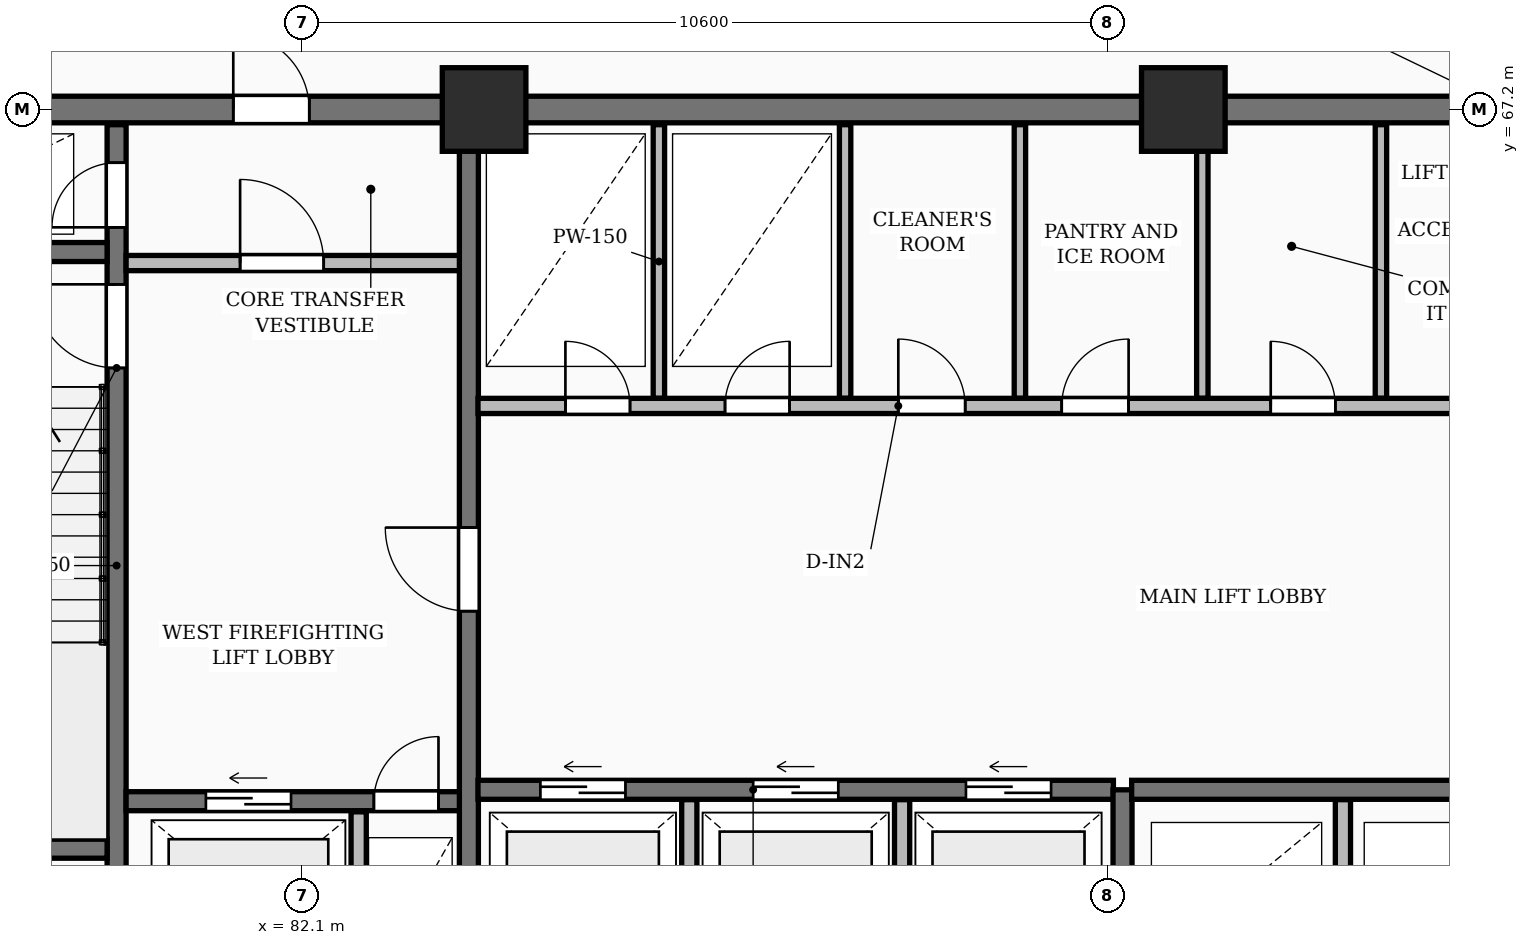
"""IFC4 building model, lengths in metres.
Left out: names, types, materials, properties, quantities, classifications, styles, units other than length and angle.
Written with IfcOpenShell. Run it as: python <this file> out.ifc"""

import sys

from ifc_helpers import new_model, si_unit, direction, frame, frame_2d, origin, origin_2d, place, context, subcontext, project, spatial, rectangle, extrude, element, fill, save


model = new_model("IFC4")
c1 = context("Model", 3, precision=1e-05, world=origin(), true_north=direction((0.0, 1.0)))
c2 = subcontext(c1, "Body", "Model", "MODEL_VIEW")
j1 = project(units=[si_unit("LENGTHUNIT", "METRE"), si_unit("PLANEANGLEUNIT", "RADIAN")], contexts=[c1])
p1 = place(None, origin())
s1 = spatial("IfcSite", under=j1, at=p1, CompositionType="ELEMENT")
p2 = place(p1, origin())
s2 = spatial("IfcBuilding", under=s1, at=p2, CompositionType="ELEMENT")
p3 = place(p2, frame((0.0, 0.0, 5.4)))
s3 = spatial("IfcBuildingStorey", under=s2, at=p3, CompositionType="ELEMENT", Elevation=5.4)
for number, where, z_axis, x_axis in (
    (1, (84.5, 67.2, 0.0), (0.0, 0.0, 1.0), (1.0, 0.0, 0.0)),
    (2, (93.7, 67.2, 0.0), (0.0, 0.0, 1.0), (1.0, 0.0, 0.0)),
):
    element("IfcColumn", number, at=place(p3, frame(where, z_axis=z_axis, x_axis=x_axis)), inside=s3, PredefinedType="COLUMN", context=c2, shape_type="SweptSolid", body=[
        extrude(rectangle(XDim=1.1, YDim=1.1, at=origin_2d()), origin(), (0.0, 0.0, 1.0), 4.6),
    ])
p4 = place(p3, frame((75.95, 67.2, 0.0), z_axis=(0.0, 0.0, 1.0), x_axis=(1.0, 0.0, 0.0)))
e3 = element("IfcWall", 3, at=p4, inside=s3, PredefinedType="SHEAR", context=c2, shape_type="SweptSolid", body=[
    extrude(rectangle(XDim=36.3, YDim=0.35, at=frame_2d((18.15, 0.0))), origin(), (0.0, 0.0, 1.0), 4.6),
])
p5 = place(p4, frame((5.25, 0.0, 0.0)))
e4 = element("IfcOpeningElement", 4, at=p5, cuts=e3, PredefinedType="OPENING", context=c2, shape_type="SweptSolid", body=[
    extrude(rectangle(XDim=1.0, YDim=2.15, at=frame_2d((0.5, 1.075))), frame((0.0, 0.185, 0.0), z_axis=(0.0, -1.0, 0.0), x_axis=(1.0, 0.0, 0.0)), (0.0, 0.0, 1.0), 0.37),
])
p6 = place(p4, frame((22.058, 0.0, 0.0)))
e5 = element("IfcOpeningElement", 5, at=p6, cuts=e3, PredefinedType="OPENING", context=c2, shape_type="SweptSolid", body=[
    extrude(rectangle(XDim=1.5, YDim=2.2, at=frame_2d((0.75, 1.1))), frame((0.0, 0.185, 0.0), z_axis=(0.0, -1.0, 0.0), x_axis=(1.0, 0.0, 0.0)), (0.0, 0.0, 1.0), 0.37),
])
p7 = place(p4, frame((30.45, 0.0, 0.0)))
e6 = element("IfcOpeningElement", 6, at=p7, cuts=e3, PredefinedType="OPENING", context=c2, shape_type="SweptSolid", body=[
    extrude(rectangle(XDim=1.0, YDim=2.15, at=frame_2d((0.5, 1.075))), frame((0.0, 0.185, 0.0), z_axis=(0.0, -1.0, 0.0), x_axis=(1.0, 0.0, 0.0)), (0.0, 0.0, 1.0), 0.37),
])
p8 = place(p3, frame((79.665, 55.4, 0.0), z_axis=(0.0, 0.0, 1.0), x_axis=(0.0, 1.0, 0.0)))
e7 = element("IfcWall", 7, at=p8, inside=s3, PredefinedType="SHEAR", context=c2, shape_type="SweptSolid", body=[
    extrude(rectangle(XDim=11.6, YDim=0.25, at=frame_2d((5.8, 0.0))), origin(), (0.0, 0.0, 1.0), 4.6),
])
p9 = place(p8, frame((0.55, 0.0, 0.0)))
e8 = element("IfcOpeningElement", 8, at=p9, cuts=e7, PredefinedType="OPENING", context=c2, shape_type="SweptSolid", body=[
    extrude(rectangle(XDim=0.85, YDim=2.05, at=frame_2d((0.425, 1.025))), frame((0.0, 0.135, 0.0), z_axis=(0.0, -1.0, 0.0), x_axis=(1.0, 0.0, 0.0)), (0.0, 0.0, 1.0), 0.27),
])
p10 = place(p8, frame((8.4, 0.0, 0.0)))
e9 = element("IfcOpeningElement", 9, at=p10, cuts=e7, PredefinedType="OPENING", context=c2, shape_type="SweptSolid", body=[
    extrude(rectangle(XDim=1.1, YDim=2.1, at=frame_2d((0.55, 1.05))), frame((0.0, 0.135, 0.0), z_axis=(0.0, -1.0, 0.0), x_axis=(1.0, 0.0, 0.0)), (0.0, 0.0, 1.0), 0.27),
])
p11 = place(p8, frame((10.25, 0.0, 0.0)))
e10 = element("IfcOpeningElement", 10, at=p11, cuts=e7, PredefinedType="OPENING", context=c2, shape_type="SweptSolid", body=[
    extrude(rectangle(XDim=0.85, YDim=2.05, at=frame_2d((0.425, 1.025))), frame((0.0, 0.135, 0.0), z_axis=(0.0, -1.0, 0.0), x_axis=(1.0, 0.0, 0.0)), (0.0, 0.0, 1.0), 0.27),
])
for number, where, z_axis, x_axis in (
    (11, (76.3, 57.475, 0.0), (0.0, 0.0, 1.0), (1.0, 0.0, 0.0)),
    (12, (76.3, 65.325, 0.0), (0.0, 0.0, 1.0), (1.0, 0.0, 0.0)),
):
    element("IfcWall", number, at=place(p3, frame(where, z_axis=z_axis, x_axis=x_axis)), inside=s3, PredefinedType="SHEAR", context=c2, shape_type="SweptSolid", body=[
        extrude(rectangle(XDim=3.24, YDim=0.25, at=frame_2d((1.62, 0.0))), origin(), (0.0, 0.0, 1.0), 4.6),
    ])
p12 = place(p3, frame((79.79, 58.1, 0.0), z_axis=(0.0, 0.0, 1.0), x_axis=(1.0, 0.0, 0.0)))
e13 = element("IfcWall", 13, at=p12, inside=s3, PredefinedType="SHEAR", context=c2, shape_type="SweptSolid", body=[
    extrude(rectangle(XDim=4.39, YDim=0.25, at=frame_2d((2.195, 0.0))), origin(), (0.0, 0.0, 1.0), 4.6),
])
p13 = place(p12, frame((1.05, 0.0, 0.0)))
e14 = element("IfcOpeningElement", 14, at=p13, cuts=e13, PredefinedType="OPENING", context=c2, shape_type="SweptSolid", body=[
    extrude(rectangle(XDim=1.12, YDim=2.12, at=frame_2d((0.56, 1.06))), frame((0.0, 0.135, 0.0), z_axis=(0.0, -1.0, 0.0), x_axis=(1.0, 0.0, 0.0)), (0.0, 0.0, 1.0), 0.27),
])
p14 = place(p12, frame((3.26, 0.0, 0.0)))
e15 = element("IfcOpeningElement", 15, at=p14, cuts=e13, PredefinedType="OPENING", context=c2, shape_type="SweptSolid", body=[
    extrude(rectangle(XDim=0.85, YDim=2.05, at=frame_2d((0.425, 1.025))), frame((0.0, 0.135, 0.0), z_axis=(0.0, -1.0, 0.0), x_axis=(1.0, 0.0, 0.0)), (0.0, 0.0, 1.0), 0.27),
])
p15 = place(p3, frame((82.85, 55.4, 0.0), z_axis=(0.0, 0.0, 1.0), x_axis=(0.0, 1.0, 0.0)))
e16 = element("IfcWall", 16, at=p15, inside=s3, PredefinedType="PARTITIONING", context=c2, shape_type="SweptSolid", body=[
    extrude(rectangle(XDim=2.56, YDim=0.2, at=frame_2d((1.28, 0.0))), origin(), (0.0, 0.0, 1.0), 4.3),
])
p16 = place(p3, frame((79.79, 65.18, 0.0), z_axis=(0.0, 0.0, 1.0), x_axis=(1.0, 0.0, 0.0)))
e17 = element("IfcWall", 17, at=p16, inside=s3, PredefinedType="PARTITIONING", context=c2, shape_type="SweptSolid", body=[
    extrude(rectangle(XDim=4.39, YDim=0.2, at=frame_2d((2.195, 0.0))), origin(), (0.0, 0.0, 1.0), 4.3),
])
p17 = place(p16, frame((1.5, 0.0, 0.0)))
e18 = element("IfcOpeningElement", 18, at=p17, cuts=e17, PredefinedType="OPENING", context=c2, shape_type="SweptSolid", body=[
    extrude(rectangle(XDim=1.1, YDim=2.1, at=frame_2d((0.55, 1.05))), frame((0.0, 0.11, 0.0), z_axis=(0.0, -1.0, 0.0), x_axis=(1.0, 0.0, 0.0)), (0.0, 0.0, 1.0), 0.22),
])
p18 = place(p3, frame((84.3, 55.4, 0.0), z_axis=(0.0, 0.0, 1.0), x_axis=(0.0, 1.0, 0.0)))
e19 = element("IfcWall", 19, at=p18, inside=s3, PredefinedType="SHEAR", context=c2, shape_type="SweptSolid", body=[
    extrude(rectangle(XDim=11.6, YDim=0.25, at=frame_2d((5.8, 0.0))), origin(), (0.0, 0.0, 1.0), 4.6),
])
p19 = place(p18, frame((5.2, 0.0, 0.0)))
e20 = element("IfcOpeningElement", 20, at=p19, cuts=e19, PredefinedType="OPENING", context=c2, shape_type="SweptSolid", body=[
    extrude(rectangle(XDim=1.1, YDim=2.1, at=frame_2d((0.55, 1.05))), frame((0.0, 0.135, 0.0), z_axis=(0.0, -1.0, 0.0), x_axis=(1.0, 0.0, 0.0)), (0.0, 0.0, 1.0), 0.27),
])
for number, where, z_axis, x_axis in (
    (21, (87.2, 55.4, 0.0), (0.0, 0.0, 1.0), (0.0, 1.0, 0.0)),
    (22, (90.0, 55.4, 0.0), (0.0, 0.0, 1.0), (0.0, 1.0, 0.0)),
):
    element("IfcWall", number, at=place(p3, frame(where, z_axis=z_axis, x_axis=x_axis)), inside=s3, PredefinedType="PARTITIONING", context=c2, shape_type="SweptSolid", body=[
        extrude(rectangle(XDim=2.72, YDim=0.2, at=frame_2d((1.36, 0.0))), origin(), (0.0, 0.0, 1.0), 4.3),
    ])
p20 = place(p3, frame((84.42, 58.25, 0.0), z_axis=(0.0, 0.0, 1.0), x_axis=(1.0, 0.0, 0.0)))
e23 = element("IfcWall", 23, at=p20, inside=s3, PredefinedType="SHEAR", context=c2, shape_type="SweptSolid", body=[
    extrude(rectangle(XDim=8.36, YDim=0.25, at=frame_2d((4.18, 0.0))), origin(), (0.0, 0.0, 1.0), 4.6),
])
p21 = place(p20, frame((0.82, 0.0, 0.0)))
e24 = element("IfcOpeningElement", 24, at=p21, cuts=e23, PredefinedType="OPENING", context=c2, shape_type="SweptSolid", body=[
    extrude(rectangle(XDim=1.12, YDim=2.12, at=frame_2d((0.56, 1.06))), frame((0.0, 0.135, 0.0), z_axis=(0.0, -1.0, 0.0), x_axis=(1.0, 0.0, 0.0)), (0.0, 0.0, 1.0), 0.27),
])
p22 = place(p20, frame((3.62, 0.0, 0.0)))
e25 = element("IfcOpeningElement", 25, at=p22, cuts=e23, PredefinedType="OPENING", context=c2, shape_type="SweptSolid", body=[
    extrude(rectangle(XDim=1.12, YDim=2.12, at=frame_2d((0.56, 1.06))), frame((0.0, 0.135, 0.0), z_axis=(0.0, -1.0, 0.0), x_axis=(1.0, 0.0, 0.0)), (0.0, 0.0, 1.0), 0.27),
])
p23 = place(p20, frame((6.42, 0.0, 0.0)))
e26 = element("IfcOpeningElement", 26, at=p23, cuts=e23, PredefinedType="OPENING", context=c2, shape_type="SweptSolid", body=[
    extrude(rectangle(XDim=1.12, YDim=2.12, at=frame_2d((0.56, 1.06))), frame((0.0, 0.135, 0.0), z_axis=(0.0, -1.0, 0.0), x_axis=(1.0, 0.0, 0.0)), (0.0, 0.0, 1.0), 0.27),
])
p24 = place(p3, frame((92.9, 55.4, 0.0), z_axis=(0.0, 0.0, 1.0), x_axis=(0.0, 1.0, 0.0)))
e27 = element("IfcWall", 27, at=p24, inside=s3, PredefinedType="SHEAR", context=c2, shape_type="SweptSolid", body=[
    extrude(rectangle(XDim=2.85, YDim=0.25, at=frame_2d((1.425, 0.0))), origin(), (0.0, 0.0, 1.0), 4.6),
])
p25 = place(p3, frame((95.8, 55.4, 0.0), z_axis=(0.0, 0.0, 1.0), x_axis=(0.0, 1.0, 0.0)))
e28 = element("IfcWall", 28, at=p25, inside=s3, PredefinedType="PARTITIONING", context=c2, shape_type="SweptSolid", body=[
    extrude(rectangle(XDim=2.72, YDim=0.2, at=frame_2d((1.36, 0.0))), origin(), (0.0, 0.0, 1.0), 4.3),
])
p26 = place(p3, frame((93.02, 58.25, 0.0), z_axis=(0.0, 0.0, 1.0), x_axis=(1.0, 0.0, 0.0)))
e29 = element("IfcWall", 29, at=p26, inside=s3, PredefinedType="SHEAR", context=c2, shape_type="SweptSolid", body=[
    extrude(rectangle(XDim=8.36, YDim=0.25, at=frame_2d((4.18, 0.0))), origin(), (0.0, 0.0, 1.0), 4.6),
])
for number, where, z_axis, x_axis in (
    (30, (86.8, 63.4, 0.0), (0.0, 0.0, 1.0), (0.0, 1.0, 0.0)),
    (31, (89.25, 63.4, 0.0), (0.0, 0.0, 1.0), (0.0, 1.0, 0.0)),
    (32, (91.55, 63.4, 0.0), (0.0, 0.0, 1.0), (0.0, 1.0, 0.0)),
):
    element("IfcWall", number, at=place(p3, frame(where, z_axis=z_axis, x_axis=x_axis)), inside=s3, PredefinedType="PARTITIONING", context=c2, shape_type="SweptSolid", body=[
        extrude(rectangle(XDim=3.6, YDim=0.15, at=frame_2d((1.8, 0.0))), origin(), (0.0, 0.0, 1.0), 4.3),
    ])
p27 = place(p3, frame((93.95, 63.4, 0.0), z_axis=(0.0, 0.0, 1.0), x_axis=(0.0, 1.0, 0.0)))
e33 = element("IfcWall", 33, at=p27, inside=s3, PredefinedType="PARTITIONING", context=c2, shape_type="SweptSolid", body=[
    extrude(rectangle(XDim=3.6, YDim=0.15, at=frame_2d((1.8, 0.0))), origin(), (0.0, 0.0, 1.0), 3.55),
])
p28 = place(p3, frame((96.3, 63.4, 0.0), z_axis=(0.0, 0.0, 1.0), x_axis=(0.0, 1.0, 0.0)))
e34 = element("IfcWall", 34, at=p28, inside=s3, PredefinedType="PARTITIONING", context=c2, shape_type="SweptSolid", body=[
    extrude(rectangle(XDim=3.6, YDim=0.15, at=frame_2d((1.8, 0.0))), origin(), (0.0, 0.0, 1.0), 4.3),
])
p29 = place(p3, frame((84.42, 63.3, 0.0), z_axis=(0.0, 0.0, 1.0), x_axis=(1.0, 0.0, 0.0)))
e35 = element("IfcWall", 35, at=p29, inside=s3, PredefinedType="PARTITIONING", context=c2, shape_type="SweptSolid", body=[
    extrude(rectangle(XDim=19.83, YDim=0.2, at=frame_2d((9.915, 0.0))), origin(), (0.0, 0.0, 1.0), 4.3),
])
p30 = place(p29, frame((1.15, 0.0, 0.0)))
e36 = element("IfcOpeningElement", 36, at=p30, cuts=e35, PredefinedType="OPENING", context=c2, shape_type="SweptSolid", body=[
    extrude(rectangle(XDim=0.85, YDim=2.05, at=frame_2d((0.425, 1.025))), frame((0.0, 0.11, 0.0), z_axis=(0.0, -1.0, 0.0), x_axis=(1.0, 0.0, 0.0)), (0.0, 0.0, 1.0), 0.22),
])
p31 = place(p29, frame((3.25, 0.0, 0.0)))
e37 = element("IfcOpeningElement", 37, at=p31, cuts=e35, PredefinedType="OPENING", context=c2, shape_type="SweptSolid", body=[
    extrude(rectangle(XDim=0.85, YDim=2.05, at=frame_2d((0.425, 1.025))), frame((0.0, 0.11, 0.0), z_axis=(0.0, -1.0, 0.0), x_axis=(1.0, 0.0, 0.0)), (0.0, 0.0, 1.0), 0.22),
])
p32 = place(p29, frame((13.08, 0.0, 0.0)))
e38 = element("IfcOpeningElement", 38, at=p32, cuts=e35, PredefinedType="OPENING", context=c2, shape_type="SweptSolid", body=[
    extrude(rectangle(XDim=1.5, YDim=2.2, at=frame_2d((0.75, 1.1))), frame((0.0, 0.11, 0.0), z_axis=(0.0, -1.0, 0.0), x_axis=(1.0, 0.0, 0.0)), (0.0, 0.0, 1.0), 0.22),
])
p33 = place(p29, frame((5.53, 0.0, 0.0)))
e39 = element("IfcOpeningElement", 39, at=p33, cuts=e35, PredefinedType="OPENING", context=c2, shape_type="SweptSolid", body=[
    extrude(rectangle(XDim=0.88, YDim=2.06, at=frame_2d((0.44, 1.03))), frame((0.0, 0.11, 0.0), z_axis=(0.0, -1.0, 0.0), x_axis=(1.0, 0.0, 0.0)), (0.0, 0.0, 1.0), 0.22),
])
p34 = place(p29, frame((7.68, 0.0, 0.0)))
e40 = element("IfcOpeningElement", 40, at=p34, cuts=e35, PredefinedType="OPENING", context=c2, shape_type="SweptSolid", body=[
    extrude(rectangle(XDim=0.88, YDim=2.06, at=frame_2d((0.44, 1.03))), frame((0.0, 0.11, 0.0), z_axis=(0.0, -1.0, 0.0), x_axis=(1.0, 0.0, 0.0)), (0.0, 0.0, 1.0), 0.22),
])
p35 = place(p29, frame((10.43, 0.0, 0.0)))
e41 = element("IfcOpeningElement", 41, at=p35, cuts=e35, PredefinedType="OPENING", context=c2, shape_type="SweptSolid", body=[
    extrude(rectangle(XDim=0.85, YDim=2.05, at=frame_2d((0.425, 1.025))), frame((0.0, 0.11, 0.0), z_axis=(0.0, -1.0, 0.0), x_axis=(1.0, 0.0, 0.0)), (0.0, 0.0, 1.0), 0.22),
])
p36 = place(p29, frame((16.23, 0.0, 0.0)))
e42 = element("IfcOpeningElement", 42, at=p36, cuts=e35, PredefinedType="OPENING", context=c2, shape_type="SweptSolid", body=[
    extrude(rectangle(XDim=0.96, YDim=2.1, at=frame_2d((0.48, 1.05))), frame((0.0, 0.11, 0.0), z_axis=(0.0, -1.0, 0.0), x_axis=(1.0, 0.0, 0.0)), (0.0, 0.0, 1.0), 0.22),
])
p37 = place(p29, frame((18.68, 0.0, 0.0)))
e43 = element("IfcOpeningElement", 43, at=p37, cuts=e35, PredefinedType="OPENING", context=c2, shape_type="SweptSolid", body=[
    extrude(rectangle(XDim=0.84, YDim=2.04, at=frame_2d((0.42, 1.02))), frame((0.0, 0.11, 0.0), z_axis=(0.0, -1.0, 0.0), x_axis=(1.0, 0.0, 0.0)), (0.0, 0.0, 1.0), 0.22),
])
p38 = place(p5, origin())
e44 = element("IfcDoor", 44, at=p38, inside=s3, OperationType="SINGLE_SWING_LEFT", PredefinedType="DOOR", context=c2, shape_type="SweptSolid", body=[
    extrude(rectangle(XDim=1.0, YDim=2.15, at=frame_2d((0.5, 1.075))), frame((0.0, 0.025, 0.0), z_axis=(0.0, -1.0, 0.0), x_axis=(1.0, 0.0, 0.0)), (0.0, 0.0, 1.0), 0.05),
])
fill(e4, e44)
p39 = place(p10, origin())
e45 = element("IfcDoor", 45, at=p39, inside=s3, OperationType="SINGLE_SWING_RIGHT", PredefinedType="DOOR", context=c2, shape_type="SweptSolid", body=[
    extrude(rectangle(XDim=1.1, YDim=2.1, at=frame_2d((0.55, 1.05))), frame((0.0, 0.025, 0.0), z_axis=(0.0, -1.0, 0.0), x_axis=(1.0, 0.0, 0.0)), (0.0, 0.0, 1.0), 0.05),
])
fill(e9, e45)
p40 = place(p11, origin())
e46 = element("IfcDoor", 46, at=p40, inside=s3, OperationType="SINGLE_SWING_LEFT", PredefinedType="DOOR", context=c2, shape_type="SweptSolid", body=[
    extrude(rectangle(XDim=0.85, YDim=2.05, at=frame_2d((0.425, 1.025))), frame((0.0, 0.025, 0.0), z_axis=(0.0, -1.0, 0.0), x_axis=(1.0, 0.0, 0.0)), (0.0, 0.0, 1.0), 0.05),
])
fill(e10, e46)
p41 = place(p13, origin())
e47 = element("IfcDoor", 47, at=p41, inside=s3, OperationType="SLIDING_TO_LEFT", PredefinedType="DOOR", context=c2, shape_type="SweptSolid", body=[
    extrude(rectangle(XDim=1.12, YDim=2.12, at=frame_2d((0.56, 1.06))), frame((0.0, 0.025, 0.0), z_axis=(0.0, -1.0, 0.0), x_axis=(1.0, 0.0, 0.0)), (0.0, 0.0, 1.0), 0.05),
])
fill(e14, e47)
p42 = place(p14, origin())
e48 = element("IfcDoor", 48, at=p42, inside=s3, OperationType="SINGLE_SWING_RIGHT", PredefinedType="DOOR", context=c2, shape_type="SweptSolid", body=[
    extrude(rectangle(XDim=0.85, YDim=2.05, at=frame_2d((0.425, 1.025))), frame((0.0, 0.025, 0.0), z_axis=(0.0, -1.0, 0.0), x_axis=(1.0, 0.0, 0.0)), (0.0, 0.0, 1.0), 0.05),
])
fill(e15, e48)
p43 = place(p17, origin())
e49 = element("IfcDoor", 49, at=p43, inside=s3, OperationType="SINGLE_SWING_LEFT", PredefinedType="DOOR", context=c2, shape_type="SweptSolid", body=[
    extrude(rectangle(XDim=1.1, YDim=2.1, at=frame_2d((0.55, 1.05))), frame((0.0, 0.025, 0.0), z_axis=(0.0, -1.0, 0.0), x_axis=(1.0, 0.0, 0.0)), (0.0, 0.0, 1.0), 0.05),
])
fill(e18, e49)
p44 = place(p19, origin())
e50 = element("IfcDoor", 50, at=p44, inside=s3, OperationType="SINGLE_SWING_RIGHT", PredefinedType="DOOR", context=c2, shape_type="SweptSolid", body=[
    extrude(rectangle(XDim=1.1, YDim=2.1, at=frame_2d((0.55, 1.05))), frame((0.0, 0.025, 0.0), z_axis=(0.0, -1.0, 0.0), x_axis=(1.0, 0.0, 0.0)), (0.0, 0.0, 1.0), 0.05),
])
fill(e20, e50)
p45 = place(p21, origin())
e51 = element("IfcDoor", 51, at=p45, inside=s3, OperationType="SLIDING_TO_LEFT", PredefinedType="DOOR", context=c2, shape_type="SweptSolid", body=[
    extrude(rectangle(XDim=1.12, YDim=2.12, at=frame_2d((0.56, 1.06))), frame((0.0, 0.025, 0.0), z_axis=(0.0, -1.0, 0.0), x_axis=(1.0, 0.0, 0.0)), (0.0, 0.0, 1.0), 0.05),
])
fill(e24, e51)
p46 = place(p22, origin())
e52 = element("IfcDoor", 52, at=p46, inside=s3, OperationType="SLIDING_TO_LEFT", PredefinedType="DOOR", context=c2, shape_type="SweptSolid", body=[
    extrude(rectangle(XDim=1.12, YDim=2.12, at=frame_2d((0.56, 1.06))), frame((0.0, 0.025, 0.0), z_axis=(0.0, -1.0, 0.0), x_axis=(1.0, 0.0, 0.0)), (0.0, 0.0, 1.0), 0.05),
])
fill(e25, e52)
p47 = place(p23, origin())
e53 = element("IfcDoor", 53, at=p47, inside=s3, OperationType="SLIDING_TO_LEFT", PredefinedType="DOOR", context=c2, shape_type="SweptSolid", body=[
    extrude(rectangle(XDim=1.12, YDim=2.12, at=frame_2d((0.56, 1.06))), frame((0.0, 0.025, 0.0), z_axis=(0.0, -1.0, 0.0), x_axis=(1.0, 0.0, 0.0)), (0.0, 0.0, 1.0), 0.05),
])
fill(e26, e53)
p48 = place(p30, origin())
e54 = element("IfcDoor", 54, at=p48, inside=s3, OperationType="SINGLE_SWING_LEFT", PredefinedType="DOOR", context=c2, shape_type="SweptSolid", body=[
    extrude(rectangle(XDim=0.85, YDim=2.05, at=frame_2d((0.425, 1.025))), frame((0.0, 0.025, 0.0), z_axis=(0.0, -1.0, 0.0), x_axis=(1.0, 0.0, 0.0)), (0.0, 0.0, 1.0), 0.05),
])
fill(e36, e54)
p49 = place(p31, origin())
e55 = element("IfcDoor", 55, at=p49, inside=s3, OperationType="SINGLE_SWING_RIGHT", PredefinedType="DOOR", context=c2, shape_type="SweptSolid", body=[
    extrude(rectangle(XDim=0.85, YDim=2.05, at=frame_2d((0.425, 1.025))), frame((0.0, 0.025, 0.0), z_axis=(0.0, -1.0, 0.0), x_axis=(1.0, 0.0, 0.0)), (0.0, 0.0, 1.0), 0.05),
])
fill(e37, e55)
p50 = place(p33, origin())
e56 = element("IfcDoor", 56, at=p50, inside=s3, OperationType="SINGLE_SWING_LEFT", PredefinedType="DOOR", context=c2, shape_type="SweptSolid", body=[
    extrude(rectangle(XDim=0.88, YDim=2.06, at=frame_2d((0.44, 1.03))), frame((0.0, 0.025, 0.0), z_axis=(0.0, -1.0, 0.0), x_axis=(1.0, 0.0, 0.0)), (0.0, 0.0, 1.0), 0.05),
])
fill(e39, e56)
p51 = place(p34, origin())
e57 = element("IfcDoor", 57, at=p51, inside=s3, OperationType="SINGLE_SWING_RIGHT", PredefinedType="DOOR", context=c2, shape_type="SweptSolid", body=[
    extrude(rectangle(XDim=0.88, YDim=2.06, at=frame_2d((0.44, 1.03))), frame((0.0, 0.025, 0.0), z_axis=(0.0, -1.0, 0.0), x_axis=(1.0, 0.0, 0.0)), (0.0, 0.0, 1.0), 0.05),
])
fill(e40, e57)
p52 = place(p35, origin())
e58 = element("IfcDoor", 58, at=p52, inside=s3, OperationType="SINGLE_SWING_LEFT", PredefinedType="DOOR", context=c2, shape_type="SweptSolid", body=[
    extrude(rectangle(XDim=0.85, YDim=2.05, at=frame_2d((0.425, 1.025))), frame((0.0, 0.025, 0.0), z_axis=(0.0, -1.0, 0.0), x_axis=(1.0, 0.0, 0.0)), (0.0, 0.0, 1.0), 0.05),
])
fill(e41, e58)
save(model, sys.argv[1])
